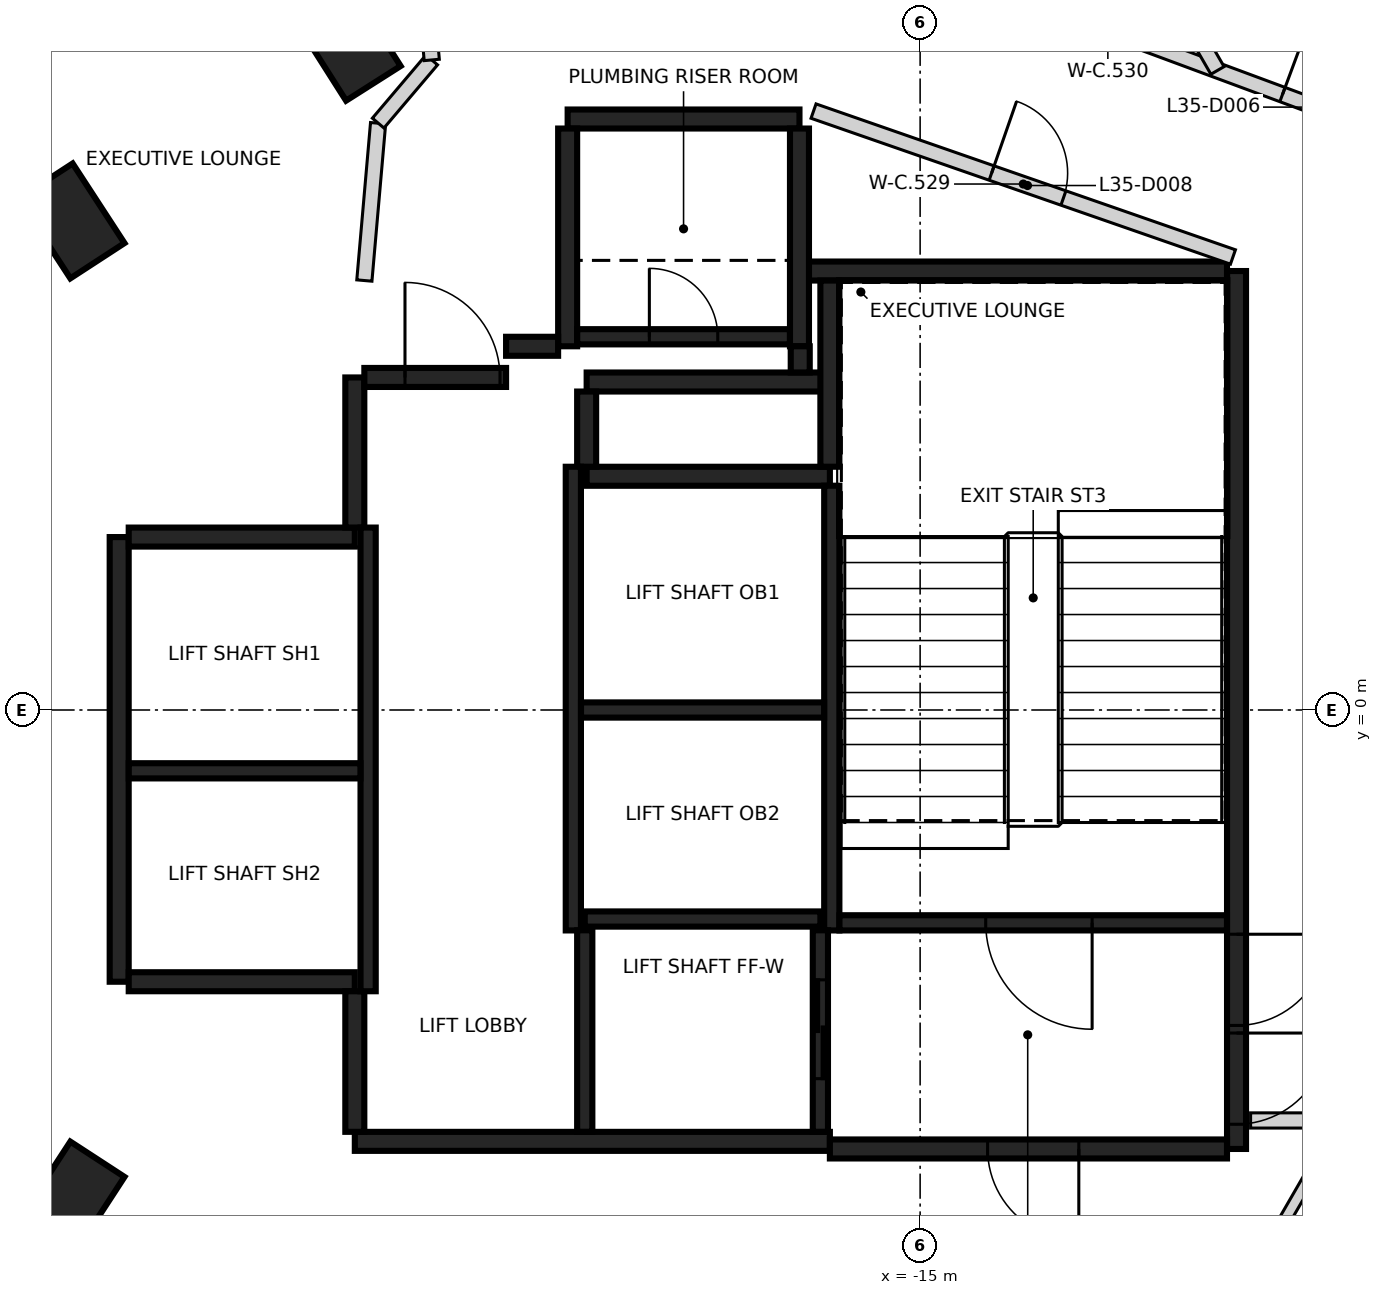
"""IFC4 building model, lengths in metres.
Left out: names, types, materials, properties, quantities, classifications, styles, units other than length and angle.
Written with IfcOpenShell. Run it as: python <this file> out.ifc"""

import sys

from ifc_helpers import new_model, si_unit, direction, frame, frame_2d, origin, origin_2d, place, context, subcontext, project, spatial, rectangle, extrude, element, fill, save


model = new_model("IFC4")
c1 = context("Model", 3, precision=1e-05, world=origin(), true_north=direction((0.0, 1.0)))
c2 = subcontext(c1, "Body", "Model", "MODEL_VIEW")
j1 = project(units=[si_unit("LENGTHUNIT", "METRE"), si_unit("PLANEANGLEUNIT", "RADIAN")], contexts=[c1])
p1 = place(None, origin())
s1 = spatial("IfcSite", under=j1, at=p1, CompositionType="ELEMENT")
p2 = place(p1, origin())
s2 = spatial("IfcBuilding", under=s1, at=p2, CompositionType="ELEMENT")
p3 = place(p2, frame((0.0, 0.0, 143.2)))
s3 = spatial("IfcBuildingStorey", under=s2, at=p3, CompositionType="ELEMENT", Elevation=143.2)
for number, where, z_axis, x_axis in (
    (1, (-22.529, 8.772, -0.4), (0.0, 0.0, 1.0), (-0.536, 0.844, 0.0)),
    (2, (-26.165, 6.434, -0.4), (0.0, 0.0, 1.0), (-0.546, 0.838, 0.0)),
    (3, (-26.165, -6.434, -0.4), (0.0, 0.0, 1.0), (0.546, 0.838, 0.0)),
):
    element("IfcColumn", number, at=place(p3, frame(where, z_axis=z_axis, x_axis=x_axis)), inside=s3, PredefinedType="COLUMN", context=c2, shape_type="SweptSolid", body=[
        extrude(rectangle(XDim=1.25, YDim=0.85, at=origin_2d()), origin(), (0.0, 0.0, 1.0), 3.6),
    ])
p4 = place(p3, frame((-10.837, 5.775, 0.0), z_axis=(0.0, 0.0, 1.0), x_axis=(0.0, -1.0, 0.0)))
e4 = element("IfcWall", 4, at=p4, inside=s3, PredefinedType="SHEAR", context=c2, shape_type="SweptSolid", body=[
    extrude(rectangle(XDim=11.55, YDim=0.25, at=frame_2d((5.775, 0.0))), origin(), (0.0, 0.0, 1.0), 3.2),
])
p5 = place(p4, frame((10.025, 0.0, 0.0)))
e5 = element("IfcOpeningElement", 5, at=p5, cuts=e4, PredefinedType="OPENING", context=c2, shape_type="SweptSolid", body=[
    extrude(rectangle(XDim=1.2, YDim=2.1, at=frame_2d((0.6, 1.05))), frame((0.0, 0.135, 0.0), z_axis=(0.0, -1.0, 0.0), x_axis=(1.0, 0.0, 0.0)), (0.0, 0.0, 1.0), 0.27),
])
p6 = place(p4, frame((8.725, 0.0, 0.0)))
e6 = element("IfcOpeningElement", 6, at=p6, cuts=e4, PredefinedType="OPENING", context=c2, shape_type="SweptSolid", body=[
    extrude(rectangle(XDim=1.2, YDim=2.1, at=frame_2d((0.6, 1.05))), frame((0.0, 0.135, 0.0), z_axis=(0.0, -1.0, 0.0), x_axis=(1.0, 0.0, 0.0)), (0.0, 0.0, 1.0), 0.27),
])
p7 = place(p3, frame((-16.187, -5.675, 0.0), z_axis=(0.0, 0.0, 1.0), x_axis=(-1.0, 0.0, 0.0)))
e7 = element("IfcWall", 7, at=p7, inside=s3, PredefinedType="SHEAR", context=c2, shape_type="SweptSolid", body=[
    extrude(rectangle(XDim=6.25, YDim=0.25, at=frame_2d((3.125, 0.0))), origin(), (0.0, 0.0, 1.0), 3.2),
])
p8 = place(p3, frame((-25.537, -3.575, 0.0), z_axis=(0.0, 0.0, 1.0), x_axis=(0.0, 1.0, 0.0)))
e8 = element("IfcWall", 8, at=p8, inside=s3, PredefinedType="SHEAR", context=c2, shape_type="SweptSolid", body=[
    extrude(rectangle(XDim=5.85, YDim=0.25, at=frame_2d((2.925, 0.0))), origin(), (0.0, 0.0, 1.0), 3.2),
])
p9 = place(p3, frame((-10.963, -5.775, 0.0), z_axis=(0.0, 0.0, 1.0), x_axis=(-1.0, 0.0, 0.0)))
e9 = element("IfcWall", 9, at=p9, inside=s3, PredefinedType="SHEAR", context=c2, shape_type="SweptSolid", body=[
    extrude(rectangle(XDim=5.225, YDim=0.25, at=frame_2d((2.612, 0.0))), origin(), (0.0, 0.0, 1.0), 3.2),
])
p10 = place(p9, frame((1.95, 0.0, 0.0)))
e10 = element("IfcOpeningElement", 10, at=p10, cuts=e9, PredefinedType="OPENING", context=c2, shape_type="SweptSolid", body=[
    extrude(rectangle(XDim=1.2, YDim=2.1, at=frame_2d((0.6, 1.05))), frame((0.0, 0.135, 0.0), z_axis=(0.0, -1.0, 0.0), x_axis=(1.0, 0.0, 0.0)), (0.0, 0.0, 1.0), 0.27),
])
p11 = place(p3, frame((-16.472, 5.775, 0.0), z_axis=(0.0, 0.0, 1.0), x_axis=(1.0, 0.0, 0.0)))
e11 = element("IfcWall", 11, at=p11, inside=s3, PredefinedType="SHEAR", context=c2, shape_type="SweptSolid", body=[
    extrude(rectangle(XDim=5.51, YDim=0.25, at=frame_2d((2.755, 0.0))), origin(), (0.0, 0.0, 1.0), 3.2),
])
p12 = place(p3, frame((-19.387, 3.075, 0.0), z_axis=(0.0, 0.0, 1.0), x_axis=(1.0, 0.0, 0.0)))
e12 = element("IfcWall", 12, at=p12, inside=s3, PredefinedType="SHEAR", context=c2, shape_type="SweptSolid", body=[
    extrude(rectangle(XDim=3.2, YDim=0.25, at=frame_2d((1.6, 0.0))), origin(), (0.0, 0.0, 1.0), 3.2),
])
for number, where, z_axis, x_axis in (
    (13, (-22.437, -3.575, 0.0), (0.0, 0.0, 1.0), (-1.0, 0.0, 0.0)),
    (14, (-25.412, 2.275, 0.0), (0.0, 0.0, 1.0), (1.0, 0.0, 0.0)),
):
    element("IfcWall", number, at=place(p3, frame(where, z_axis=z_axis, x_axis=x_axis)), inside=s3, PredefinedType="SHEAR", context=c2, shape_type="SweptSolid", body=[
        extrude(rectangle(XDim=2.975, YDim=0.25, at=frame_2d((1.487, 0.0))), origin(), (0.0, 0.0, 1.0), 3.2),
    ])
p13 = place(p3, frame((-19.637, 7.775, 0.0), z_axis=(0.0, 0.0, 1.0), x_axis=(1.0, 0.0, 0.0)))
e15 = element("IfcWall", 15, at=p13, inside=s3, PredefinedType="SHEAR", context=c2, shape_type="SweptSolid", body=[
    extrude(rectangle(XDim=3.05, YDim=0.25, at=frame_2d((1.525, 0.0))), origin(), (0.0, 0.0, 1.0), 3.2),
])
for number, where, z_axis, x_axis in (
    (16, (-16.587, 7.65, 0.0), (0.0, 0.0, 1.0), (0.0, -1.0, 0.0)),
    (17, (-19.637, 4.785, 0.0), (0.0, 0.0, 1.0), (0.0, 1.0, 0.0)),
):
    element("IfcWall", number, at=place(p3, frame(where, z_axis=z_axis, x_axis=x_axis)), inside=s3, PredefinedType="SHEAR", context=c2, shape_type="SweptSolid", body=[
        extrude(rectangle(XDim=2.865, YDim=0.25, at=frame_2d((1.432, 0.0))), origin(), (0.0, 0.0, 1.0), 3.2),
    ])
p14 = place(p3, frame((-16.302, 4.315, 0.0), z_axis=(0.0, 0.0, 1.0), x_axis=(-1.0, 0.0, 0.0)))
e18 = element("IfcWall", 18, at=p14, inside=s3, PredefinedType="SHEAR", context=c2, shape_type="SweptSolid", body=[
    extrude(rectangle(XDim=3.085, YDim=0.25, at=frame_2d((1.542, 0.0))), origin(), (0.0, 0.0, 1.0), 3.2),
])
p15 = place(p3, frame((-16.187, 3.2, 0.0), z_axis=(0.0, 0.0, 1.0), x_axis=(0.0, 1.0, 0.0)))
e19 = element("IfcWall", 19, at=p15, inside=s3, PredefinedType="SHEAR", context=c2, shape_type="SweptSolid", body=[
    extrude(rectangle(XDim=2.449, YDim=0.25, at=frame_2d((1.225, 0.0))), origin(), (0.0, 0.0, 1.0), 3.2),
])
p16 = place(p3, frame((-22.437, 2.4, 0.0), z_axis=(0.0, 0.0, 1.0), x_axis=(0.0, 1.0, 0.0)))
e20 = element("IfcWall", 20, at=p16, inside=s3, PredefinedType="SHEAR", context=c2, shape_type="SweptSolid", body=[
    extrude(rectangle(XDim=1.975, YDim=0.25, at=frame_2d((0.987, 0.0))), origin(), (0.0, 0.0, 1.0), 3.2),
])
p17 = place(p3, frame((-22.437, -5.55, 0.0), z_axis=(0.0, 0.0, 1.0), x_axis=(0.0, 1.0, 0.0)))
e21 = element("IfcWall", 21, at=p17, inside=s3, PredefinedType="SHEAR", context=c2, shape_type="SweptSolid", body=[
    extrude(rectangle(XDim=1.849, YDim=0.25, at=frame_2d((0.925, 0.0))), origin(), (0.0, 0.0, 1.0), 3.2),
])
p18 = place(p3, frame((-22.312, 4.375, 0.0), z_axis=(0.0, 0.0, 1.0), x_axis=(1.0, 0.0, 0.0)))
e22 = element("IfcWall", 22, at=p18, inside=s3, PredefinedType="SHEAR", context=c2, shape_type="SweptSolid", body=[
    extrude(rectangle(XDim=1.865, YDim=0.25, at=frame_2d((0.932, 0.0))), origin(), (0.0, 0.0, 1.0), 3.2),
])
p19 = place(p18, frame((0.535, 0.0, 0.0)))
e23 = element("IfcOpeningElement", 23, at=p19, cuts=e22, PredefinedType="OPENING", context=c2, shape_type="SweptSolid", body=[
    extrude(rectangle(XDim=1.25, YDim=2.1, at=frame_2d((0.625, 1.05))), frame((0.0, 0.135, 0.0), z_axis=(0.0, -1.0, 0.0), x_axis=(1.0, 0.0, 0.0)), (0.0, 0.0, 1.0), 0.27),
])
p20 = place(p3, frame((-19.387, 4.19, 0.0), z_axis=(0.0, 0.0, 1.0), x_axis=(0.0, -1.0, 0.0)))
e24 = element("IfcWall", 24, at=p20, inside=s3, PredefinedType="SHEAR", context=c2, shape_type="SweptSolid", body=[
    extrude(rectangle(XDim=0.989, YDim=0.25, at=frame_2d((0.495, 0.0))), origin(), (0.0, 0.0, 1.0), 3.2),
])
p21 = place(p3, frame((-20.447, 4.785, 0.0), z_axis=(0.0, 0.0, 1.0), x_axis=(1.0, 0.0, 0.0)))
e25 = element("IfcWall", 25, at=p21, inside=s3, PredefinedType="SHEAR", context=c2, shape_type="SweptSolid", body=[
    extrude(rectangle(XDim=0.685, YDim=0.25, at=frame_2d((0.342, 0.0))), origin(), (0.0, 0.0, 1.0), 3.2),
])
p22 = place(p3, frame((-16.577, 4.785, 0.0), z_axis=(0.0, 0.0, 1.0), x_axis=(0.0, -1.0, 0.0)))
e26 = element("IfcWall", 26, at=p22, inside=s3, PredefinedType="SHEAR", context=c2, shape_type="SweptSolid", body=[
    extrude(rectangle(XDim=0.344, YDim=0.25, at=frame_2d((0.172, 0.0))), origin(), (0.0, 0.0, 1.0), 3.2),
])
p23 = place(p3, frame((-16.162, 2.951, 0.0), z_axis=(0.0, 0.0, 1.0), x_axis=(0.0, -1.0, 0.0)))
e27 = element("IfcWall", 27, at=p23, inside=s3, PredefinedType="SHEAR", context=c2, shape_type="SweptSolid", body=[
    extrude(rectangle(XDim=5.851, YDim=0.2, at=frame_2d((2.925, 0.0))), origin(), (0.0, 0.0, 1.0), 3.2),
])
for number, where, z_axis, x_axis in (
    (28, (-19.562, -2.9, 0.0), (0.0, 0.0, 1.0), (0.0, 1.0, 0.0)),
    (29, (-22.262, 2.4, 0.0), (0.0, 0.0, 1.0), (0.0, -1.0, 0.0)),
):
    element("IfcWall", number, at=place(p3, frame(where, z_axis=z_axis, x_axis=x_axis)), inside=s3, PredefinedType="SHEAR", context=c2, shape_type="SweptSolid", body=[
        extrude(rectangle(XDim=6.1, YDim=0.2, at=frame_2d((3.05, 0.0))), origin(), (0.0, 0.0, 1.0), 3.2),
    ])
p24 = place(p3, frame((-10.963, -2.8, 0.0), z_axis=(0.0, 0.0, 1.0), x_axis=(-1.0, 0.0, 0.0)))
e30 = element("IfcWall", 30, at=p24, inside=s3, PredefinedType="SHEAR", context=c2, shape_type="SweptSolid", body=[
    extrude(rectangle(XDim=5.098, YDim=0.2, at=frame_2d((2.549, 0.0))), origin(), (0.0, 0.0, 1.0), 3.2),
])
p25 = place(p24, frame((1.774, 0.0, 0.0)))
e31 = element("IfcOpeningElement", 31, at=p25, cuts=e30, PredefinedType="OPENING", context=c2, shape_type="SweptSolid", body=[
    extrude(rectangle(XDim=1.4, YDim=2.1, at=frame_2d((0.7, 1.05))), frame((0.0, 0.11, 0.0), z_axis=(0.0, -1.0, 0.0), x_axis=(1.0, 0.0, 0.0)), (0.0, 0.0, 1.0), 0.22),
])
p26 = place(p3, frame((-16.263, 0.0, 0.0), z_axis=(0.0, 0.0, 1.0), x_axis=(-1.0, 0.0, 0.0)))
e32 = element("IfcWall", 32, at=p26, inside=s3, PredefinedType="SHEAR", context=c2, shape_type="SweptSolid", body=[
    extrude(rectangle(XDim=3.198, YDim=0.2, at=frame_2d((1.599, 0.0))), origin(), (0.0, 0.0, 1.0), 3.2),
])
p27 = place(p3, frame((-22.363, -0.8, 0.0), z_axis=(0.0, 0.0, 1.0), x_axis=(-1.0, 0.0, 0.0)))
e33 = element("IfcWall", 33, at=p27, inside=s3, PredefinedType="SHEAR", context=c2, shape_type="SweptSolid", body=[
    extrude(rectangle(XDim=3.048, YDim=0.2, at=frame_2d((1.524, 0.0))), origin(), (0.0, 0.0, 1.0), 3.2),
])
p28 = place(p3, frame((-19.511, 4.91, 0.0), z_axis=(0.0, 0.0, 1.0), x_axis=(1.0, 0.0, 0.0)))
e34 = element("IfcWall", 34, at=p28, inside=s3, PredefinedType="SHEAR", context=c2, shape_type="SweptSolid", body=[
    extrude(rectangle(XDim=2.798, YDim=0.2, at=frame_2d((1.399, 0.0))), origin(), (0.0, 0.0, 1.0), 3.2),
])
p29 = place(p28, frame((0.949, 0.0, 0.0)))
e35 = element("IfcOpeningElement", 35, at=p29, cuts=e34, PredefinedType="OPENING", context=c2, shape_type="SweptSolid", body=[
    extrude(rectangle(XDim=0.9, YDim=2.1, at=frame_2d((0.45, 1.05))), frame((0.0, 0.11, 0.0), z_axis=(0.0, -1.0, 0.0), x_axis=(1.0, 0.0, 0.0)), (0.0, 0.0, 1.0), 0.22),
])
p30 = place(p3, frame((-19.412, -2.75, 0.0), z_axis=(0.0, 0.0, 1.0), x_axis=(1.0, 0.0, 0.0)))
e36 = element("IfcWall", 36, at=p30, inside=s3, PredefinedType="SHEAR", context=c2, shape_type="SweptSolid", body=[
    extrude(rectangle(XDim=3.1, YDim=0.2, at=frame_2d((1.55, 0.0))), origin(), (0.0, 0.0, 1.0), 3.2),
])
p31 = place(p3, frame((-16.312, -2.898, 0.0), z_axis=(0.0, 0.0, 1.0), x_axis=(0.0, -1.0, 0.0)))
e37 = element("IfcWall", 37, at=p31, inside=s3, PredefinedType="SHEAR", context=c2, shape_type="SweptSolid", body=[
    extrude(rectangle(XDim=2.651, YDim=0.2, at=frame_2d((1.325, 0.0))), origin(), (0.0, 0.0, 1.0), 3.2),
])
p32 = place(p31, frame((0.652, 0.0, 0.0)))
e38 = element("IfcOpeningElement", 38, at=p32, cuts=e37, PredefinedType="OPENING", context=c2, shape_type="SweptSolid", body=[
    extrude(rectangle(XDim=1.3, YDim=2.1, at=frame_2d((0.65, 1.05))), frame((0.0, 0.11, 0.0), z_axis=(0.0, -1.0, 0.0), x_axis=(1.0, 0.0, 0.0)), (0.0, 0.0, 1.0), 0.22),
])
p33 = place(p3, frame((-19.412, -5.549, 0.0), z_axis=(0.0, 0.0, 1.0), x_axis=(0.0, 1.0, 0.0)))
e39 = element("IfcWall", 39, at=p33, inside=s3, PredefinedType="SHEAR", context=c2, shape_type="SweptSolid", body=[
    extrude(rectangle(XDim=2.651, YDim=0.2, at=frame_2d((1.325, 0.0))), origin(), (0.0, 0.0, 1.0), 3.2),
])
p34 = place(p3, frame((-22.131, 7.72, 0.0), z_axis=(0.0, 0.0, 1.0), x_axis=(-0.086827346826, -0.996223374471, 0.0)))
e40 = element("IfcWall", 40, at=p34, inside=s3, PredefinedType="PARTITIONING", context=c2, shape_type="SweptSolid", body=[
    extrude(rectangle(XDim=2.078, YDim=0.2, at=frame_2d((1.039, 0.0))), origin(), (0.0, 0.0, 1.0), 3.2),
])
p35 = place(p3, frame((-22.13, 7.721, 0.0), z_axis=(0.0, 0.0, 1.0), x_axis=(0.646815590698, 0.762646439466, 0.0)))
e41 = element("IfcWall", 41, at=p35, inside=s3, PredefinedType="PARTITIONING", context=c2, shape_type="SweptSolid", body=[
    extrude(rectangle(XDim=1.09, YDim=0.2, at=frame_2d((0.545, 0.0))), origin(), (0.0, 0.0, 1.0), 3.2),
])
p36 = place(p3, frame((-21.521, 9.614, 0.0), z_axis=(0.0, 0.0, 1.0), x_axis=(0.089978363699, -0.995943720331, 0.0)))
e42 = element("IfcWall", 42, at=p36, inside=s3, PredefinedType="PARTITIONING", context=c2, shape_type="SweptSolid", body=[
    extrude(rectangle(XDim=1.066, YDim=0.2, at=frame_2d((0.533, 0.0))), origin(), (0.0, 0.0, 1.0), 2.3),
])
p37 = place(p3, frame((-16.402, 7.879, 0.0), z_axis=(0.0, 0.0, 1.0), x_axis=(0.94449961557, -0.328512520596, 0.0)))
e43 = element("IfcWall", 43, at=p37, inside=s3, PredefinedType="PARTITIONING", context=c2, shape_type="SweptSolid", body=[
    extrude(rectangle(XDim=5.842, YDim=0.2, at=frame_2d((2.921, 0.0))), origin(), (0.0, 0.0, 1.0), 3.2),
])
p38 = place(p37, frame((2.481, 0.0, 0.0)))
e44 = element("IfcOpeningElement", 44, at=p38, cuts=e43, PredefinedType="OPENING", context=c2, shape_type="SweptSolid", body=[
    extrude(rectangle(XDim=1.0, YDim=2.1, at=frame_2d((0.5, 1.05))), frame((0.0, 0.11, 0.0), z_axis=(0.0, -1.0, 0.0), x_axis=(1.0, 0.0, 0.0)), (0.0, 0.0, 1.0), 0.22),
])
p39 = place(p3, frame((-16.026, 10.245, 0.0), z_axis=(0.0, 0.0, 1.0), x_axis=(0.937607706988, -0.347694963721, 0.0)))
e45 = element("IfcWall", 45, at=p39, inside=s3, PredefinedType="PARTITIONING", context=c2, shape_type="SweptSolid", body=[
    extrude(rectangle(XDim=7.458, YDim=0.2, at=frame_2d((3.729, 0.0))), origin(), (0.0, 0.0, 1.0), 3.2),
])
p40 = place(p39, frame((6.179, 0.0, 0.0)))
e46 = element("IfcOpeningElement", 46, at=p40, cuts=e45, PredefinedType="OPENING", context=c2, shape_type="SweptSolid", body=[
    extrude(rectangle(XDim=0.95, YDim=2.1, at=frame_2d((0.475, 1.05))), frame((0.0, 0.11, 0.0), z_axis=(0.0, -1.0, 0.0), x_axis=(1.0, 0.0, 0.0)), (0.0, 0.0, 1.0), 0.22),
])
p41 = place(p39, frame((2.139, 0.0, 0.0)))
e47 = element("IfcOpeningElement", 47, at=p41, cuts=e45, PredefinedType="OPENING", context=c2, shape_type="SweptSolid", body=[
    extrude(rectangle(XDim=1.0, YDim=2.1, at=frame_2d((0.5, 1.05))), frame((0.0, 0.11, 0.0), z_axis=(0.0, -1.0, 0.0), x_axis=(1.0, 0.0, 0.0)), (0.0, 0.0, 1.0), 0.22),
])
p42 = place(p3, frame((-10.652, -5.4, 0.0), z_axis=(0.0, 0.0, 1.0), x_axis=(1.0, 0.0, 0.0)))
e48 = element("IfcWall", 48, at=p42, inside=s3, PredefinedType="PARTITIONING", context=c2, shape_type="SweptSolid", body=[
    extrude(rectangle(XDim=1.205, YDim=0.2, at=frame_2d((0.603, 0.0))), origin(), (0.0, 0.0, 1.0), 3.2),
])
p43 = place(p3, frame((-15.467, 15.998, 0.0), z_axis=(0.0, 0.0, 1.0), x_axis=(0.500003998589, -0.866023095186, 0.0)))
e49 = element("IfcWall", 49, at=p43, inside=s3, PredefinedType="PARTITIONING", context=c2, shape_type="SweptSolid", body=[
    extrude(rectangle(XDim=8.757, YDim=0.2, at=frame_2d((4.379, 0.0))), origin(), (0.0, 0.0, 1.0), 2.3),
])
p44 = place(p3, frame((-10.809, 18.731, 0.0), z_axis=(0.0, 0.0, 1.0), x_axis=(0.500004774777, -0.866022647048, 0.0)))
e50 = element("IfcWall", 50, at=p44, inside=s3, PredefinedType="PARTITIONING", context=c2, shape_type="SweptSolid", body=[
    extrude(rectangle(XDim=12.227, YDim=0.2, at=frame_2d((6.113, 0.0))), origin(), (0.0, 0.0, 1.0), 2.3),
])
p45 = place(p3, frame((-10.946, -7.996, 0.0), z_axis=(0.0, 0.0, 1.0), x_axis=(0.500027927039, 0.866009279501, 0.0)))
e51 = element("IfcWall", 51, at=p45, inside=s3, PredefinedType="PARTITIONING", context=c2, shape_type="SweptSolid", body=[
    extrude(rectangle(XDim=2.998, YDim=0.15, at=frame_2d((1.499, 0.0))), origin(), (0.0, 0.0, 1.0), 3.2),
])
p46 = place(p32, origin())
e52 = element("IfcDoor", 52, at=p46, inside=s3, OperationType="SLIDING_TO_LEFT", PredefinedType="DOOR", context=c2, shape_type="SweptSolid", body=[
    extrude(rectangle(XDim=1.3, YDim=2.1, at=frame_2d((0.65, 1.05))), frame((0.0, 0.025, 0.0), z_axis=(0.0, -1.0, 0.0), x_axis=(1.0, 0.0, 0.0)), (0.0, 0.0, 1.0), 0.05),
])
fill(e38, e52)
p47 = place(p19, origin())
e53 = element("IfcDoor", 53, at=p47, inside=s3, OperationType="SINGLE_SWING_LEFT", PredefinedType="DOOR", context=c2, shape_type="SweptSolid", body=[
    extrude(rectangle(XDim=1.25, YDim=2.1, at=frame_2d((0.625, 1.05))), frame((0.0, 0.025, 0.0), z_axis=(0.0, -1.0, 0.0), x_axis=(1.0, 0.0, 0.0)), (0.0, 0.0, 1.0), 0.05),
])
fill(e23, e53)
p48 = place(p5, origin())
e54 = element("IfcDoor", 54, at=p48, inside=s3, OperationType="SINGLE_SWING_LEFT", PredefinedType="DOOR", context=c2, shape_type="SweptSolid", body=[
    extrude(rectangle(XDim=1.2, YDim=2.1, at=frame_2d((0.6, 1.05))), frame((0.0, 0.025, 0.0), z_axis=(0.0, -1.0, 0.0), x_axis=(1.0, 0.0, 0.0)), (0.0, 0.0, 1.0), 0.05),
])
fill(e5, e54)
p49 = place(p6, origin())
e55 = element("IfcDoor", 55, at=p49, inside=s3, OperationType="SINGLE_SWING_RIGHT", PredefinedType="DOOR", context=c2, shape_type="SweptSolid", body=[
    extrude(rectangle(XDim=1.2, YDim=2.1, at=frame_2d((0.6, 1.05))), frame((0.0, 0.025, 0.0), z_axis=(0.0, -1.0, 0.0), x_axis=(1.0, 0.0, 0.0)), (0.0, 0.0, 1.0), 0.05),
])
fill(e6, e55)
p50 = place(p25, origin())
e56 = element("IfcDoor", 56, at=p50, inside=s3, OperationType="SINGLE_SWING_LEFT", PredefinedType="DOOR", context=c2, shape_type="SweptSolid", body=[
    extrude(rectangle(XDim=1.4, YDim=2.1, at=frame_2d((0.7, 1.05))), frame((0.0, 0.025, 0.0), z_axis=(0.0, -1.0, 0.0), x_axis=(1.0, 0.0, 0.0)), (0.0, 0.0, 1.0), 0.05),
])
fill(e31, e56)
p51 = place(p29, origin())
e57 = element("IfcDoor", 57, at=p51, inside=s3, OperationType="SINGLE_SWING_RIGHT", PredefinedType="DOOR", context=c2, shape_type="SweptSolid", body=[
    extrude(rectangle(XDim=0.9, YDim=2.1, at=frame_2d((0.45, 1.05))), frame((0.0, 0.025, 0.0), z_axis=(0.0, -1.0, 0.0), x_axis=(1.0, 0.0, 0.0)), (0.0, 0.0, 1.0), 0.05),
])
fill(e35, e57)
p52 = place(p10, origin())
e58 = element("IfcDoor", 58, at=p52, inside=s3, OperationType="SINGLE_SWING_RIGHT", PredefinedType="DOOR", context=c2, shape_type="SweptSolid", body=[
    extrude(rectangle(XDim=1.2, YDim=2.1, at=frame_2d((0.6, 1.05))), frame((0.0, 0.025, 0.0), z_axis=(0.0, -1.0, 0.0), x_axis=(1.0, 0.0, 0.0)), (0.0, 0.0, 1.0), 0.05),
])
fill(e10, e58)
p53 = place(p40, origin())
e59 = element("IfcDoor", 59, at=p53, inside=s3, OperationType="SINGLE_SWING_LEFT", PredefinedType="DOOR", context=c2, shape_type="SweptSolid", body=[
    extrude(rectangle(XDim=0.95, YDim=2.1, at=frame_2d((0.475, 1.05))), frame((0.0, 0.025, 0.0), z_axis=(0.0, -1.0, 0.0), x_axis=(1.0, 0.0, 0.0)), (0.0, 0.0, 1.0), 0.05),
])
fill(e46, e59)
p54 = place(p38, frame((1.0, 0.0, 0.0), z_axis=(0.0, 0.0, 1.0), x_axis=(-1.0, 0.0, 0.0)))
e60 = element("IfcDoor", 60, at=p54, inside=s3, OperationType="SINGLE_SWING_LEFT", PredefinedType="DOOR", context=c2, shape_type="SweptSolid", body=[
    extrude(rectangle(XDim=1.0, YDim=2.1, at=frame_2d((0.5, 1.05))), frame((0.0, 0.025, 0.0), z_axis=(0.0, -1.0, 0.0), x_axis=(1.0, 0.0, 0.0)), (0.0, 0.0, 1.0), 0.05),
])
fill(e44, e60)
save(model, sys.argv[1])
